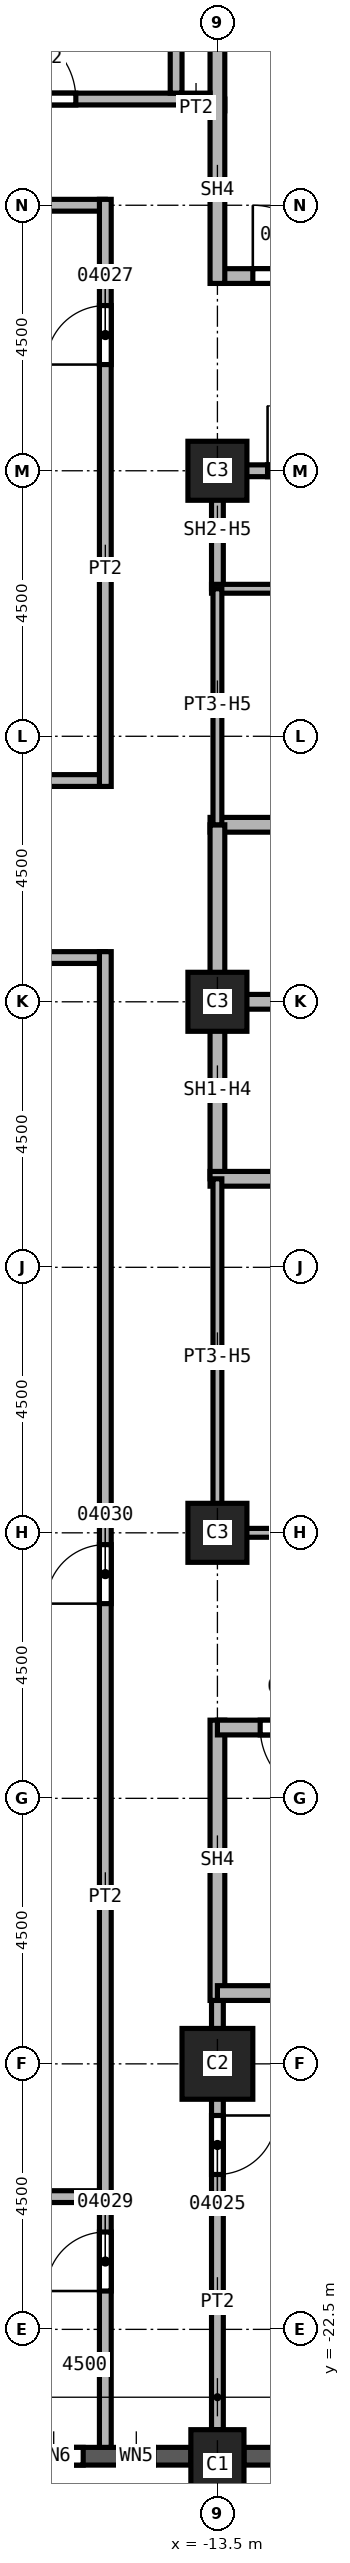
"""IFC4 building model, lengths in metres.
Left out: names, types, materials, properties, quantities, classifications, styles, units other than length and angle.
Written with IfcOpenShell. Run it as: python <this file> out.ifc"""

import sys

from ifc_helpers import new_model, si_unit, direction, frame, frame_2d, origin, origin_2d, place, context, subcontext, project, spatial, rectangle, extrude, element, fill, save


model = new_model("IFC4")
c1 = context("Model", 3, precision=1e-05, world=origin(), true_north=direction((0.0, 1.0)))
c2 = subcontext(c1, "Body", "Model", "MODEL_VIEW")
j1 = project(units=[si_unit("LENGTHUNIT", "METRE"), si_unit("PLANEANGLEUNIT", "RADIAN")], contexts=[c1])
p1 = place(None, origin())
s1 = spatial("IfcSite", under=j1, at=p1, CompositionType="ELEMENT")
p2 = place(p1, origin())
s2 = spatial("IfcBuilding", under=s1, at=p2, CompositionType="ELEMENT")
p3 = place(p2, frame((0.0, 0.0, 104.0)))
s3 = spatial("IfcBuildingStorey", under=s2, at=p3, CompositionType="ELEMENT", Elevation=104.0)
p4 = place(p3, frame((-13.5, -18.0, 0.0), z_axis=(0.0, 0.0, 1.0), x_axis=(1.0, 0.0, 0.0)))
e1 = element("IfcColumn", 1, at=p4, inside=s3, PredefinedType="COLUMN", context=c2, shape_type="SweptSolid", body=[
    extrude(rectangle(XDim=1.2, YDim=1.2, at=origin_2d()), origin(), (0.0, 0.0, 1.0), 3.7),
])
for number, where, z_axis, x_axis in (
    (2, (-13.5, 0.0, 0.0), (0.0, 0.0, 1.0), (1.0, 0.0, 0.0)),
    (3, (-13.5, 9.0, 0.0), (0.0, 0.0, 1.0), (1.0, 0.0, 0.0)),
    (4, (-13.5, -9.0, 0.0), (0.0, 0.0, 1.0), (1.0, 0.0, 0.0)),
):
    element("IfcColumn", number, at=place(p3, frame(where, z_axis=z_axis, x_axis=x_axis)), inside=s3, PredefinedType="COLUMN", context=c2, shape_type="SweptSolid", body=[
        extrude(rectangle(XDim=1.0, YDim=1.0, at=origin_2d()), origin(), (0.0, 0.0, 1.0), 3.7),
    ])
p5 = place(p3, frame((-13.5, -24.8, 0.0), z_axis=(0.0, 0.0, 1.0), x_axis=(1.0, 0.0, 0.0)))
e5 = element("IfcColumn", 5, at=p5, inside=s3, PredefinedType="COLUMN", context=c2, shape_type="SweptSolid", body=[
    extrude(rectangle(XDim=0.9, YDim=1.2, at=origin_2d()), origin(), (0.0, 0.0, 1.0), 3.7),
])
p6 = place(p3, frame((-17.55, -24.65, 0.0), z_axis=(0.0, 0.0, 1.0), x_axis=(1.0, 0.0, 0.0)))
e6 = element("IfcWall", 6, at=p6, inside=s3, PredefinedType="SOLIDWALL", context=c2, shape_type="SweptSolid", body=[
    extrude(rectangle(XDim=3.6, YDim=0.3, at=frame_2d((1.8, 0.0))), origin(), (0.0, 0.0, 1.0), 3.1),
])
p7 = place(p6, frame((0.775, 0.0, 0.8)))
e7 = element("IfcOpeningElement", 7, at=p7, cuts=e6, PredefinedType="OPENING", context=c2, shape_type="SweptSolid", body=[
    extrude(rectangle(XDim=1.0, YDim=1.95, at=frame_2d((0.5, 0.975))), frame((0.0, 0.15, 0.0), z_axis=(0.0, -1.0, 0.0), x_axis=(1.0, 0.0, 0.0)), (0.0, 0.0, 1.0), 0.3),
])
p8 = place(p6, frame((2.375, 0.0, 0.8)))
e8 = element("IfcOpeningElement", 8, at=p8, cuts=e6, PredefinedType="OPENING", context=c2, shape_type="SweptSolid", body=[
    extrude(rectangle(XDim=0.6, YDim=1.95, at=frame_2d((0.3, 0.975))), frame((0.0, 0.15, 0.0), z_axis=(0.0, -1.0, 0.0), x_axis=(1.0, 0.0, 0.0)), (0.0, 0.0, 1.0), 0.3),
])
p9 = place(p3, frame((-13.05, -24.65, 0.0), z_axis=(0.0, 0.0, 1.0), x_axis=(1.0, 0.0, 0.0)))
e9 = element("IfcWall", 9, at=p9, inside=s3, PredefinedType="SOLIDWALL", context=c2, shape_type="SweptSolid", body=[
    extrude(rectangle(XDim=3.6, YDim=0.3, at=frame_2d((1.8, 0.0))), origin(), (0.0, 0.0, 1.0), 3.1),
])
p10 = place(p9, frame((0.6, 0.0, 0.8)))
e10 = element("IfcOpeningElement", 10, at=p10, cuts=e9, PredefinedType="OPENING", context=c2, shape_type="SweptSolid", body=[
    extrude(rectangle(XDim=2.4, YDim=1.95, at=frame_2d((1.2, 0.975))), frame((0.0, 0.15, 0.0), z_axis=(0.0, -1.0, 0.0), x_axis=(1.0, 0.0, 0.0)), (0.0, 0.0, 1.0), 0.3),
])
p11 = place(p3, frame((-33.85, 3.75, 0.0), z_axis=(0.0, 0.0, 1.0), x_axis=(1.0, 0.0, 0.0)))
e11 = element("IfcWall", 11, at=p11, inside=s3, PredefinedType="PARTITIONING", context=c2, shape_type="SweptSolid", body=[
    extrude(rectangle(XDim=18.45, YDim=0.2, at=frame_2d((9.225, 0.0))), origin(), (0.0, 0.0, 1.0), 3.7),
])
p12 = place(p3, frame((-15.4, 0.75, 0.0), z_axis=(0.0, 0.0, 1.0), x_axis=(-1.0, 0.0, 0.0)))
e12 = element("IfcWall", 12, at=p12, inside=s3, PredefinedType="PARTITIONING", context=c2, shape_type="SweptSolid", body=[
    extrude(rectangle(XDim=18.45, YDim=0.2, at=frame_2d((9.225, 0.0))), origin(), (0.0, 0.0, 1.0), 3.7),
])
p13 = place(p12, frame((12.65, 0.0, 0.0)))
e13 = element("IfcOpeningElement", 13, at=p13, cuts=e12, PredefinedType="OPENING", context=c2, shape_type="SweptSolid", body=[
    extrude(rectangle(XDim=1.0, YDim=2.1, at=frame_2d((0.5, 1.05))), frame((0.0, 0.1, 0.0), z_axis=(0.0, -1.0, 0.0), x_axis=(1.0, 0.0, 0.0)), (0.0, 0.0, 1.0), 0.2),
])
p14 = place(p3, frame((-24.3, -20.25, 0.0), z_axis=(0.0, 0.0, 1.0), x_axis=(1.0, 0.0, 0.0)))
e14 = element("IfcWall", 14, at=p14, inside=s3, PredefinedType="PARTITIONING", context=c2, shape_type="SweptSolid", body=[
    extrude(rectangle(XDim=8.9, YDim=0.2, at=frame_2d((4.45, 0.0))), origin(), (0.0, 0.0, 1.0), 3.7),
])
p15 = place(p3, frame((-15.4, 13.5, 0.0), z_axis=(0.0, 0.0, 1.0), x_axis=(-1.0, 0.0, 0.0)))
e15 = element("IfcWall", 15, at=p15, inside=s3, PredefinedType="PARTITIONING", context=c2, shape_type="SweptSolid", body=[
    extrude(rectangle(XDim=6.6, YDim=0.2, at=frame_2d((3.3, 0.0))), origin(), (0.0, 0.0, 1.0), 3.7),
])
p16 = place(p3, frame((-15.4, -24.5, 0.0), z_axis=(0.0, 0.0, 1.0), x_axis=(0.0, 1.0, 0.0)))
e16 = element("IfcWall", 16, at=p16, inside=s3, PredefinedType="PARTITIONING", context=c2, shape_type="SweptSolid", body=[
    extrude(rectangle(XDim=25.35, YDim=0.2, at=frame_2d((12.675, 0.0))), origin(), (0.0, 0.0, 1.0), 3.7),
])
p17 = place(p16, frame((2.65, 0.0, 0.0)))
e17 = element("IfcOpeningElement", 17, at=p17, cuts=e16, PredefinedType="OPENING", context=c2, shape_type="SweptSolid", body=[
    extrude(rectangle(XDim=1.0, YDim=2.1, at=frame_2d((0.5, 1.05))), frame((0.0, 0.1, 0.0), z_axis=(0.0, -1.0, 0.0), x_axis=(1.0, 0.0, 0.0)), (0.0, 0.0, 1.0), 0.2),
])
p18 = place(p16, frame((14.3, 0.0, 0.0)))
e18 = element("IfcOpeningElement", 18, at=p18, cuts=e16, PredefinedType="OPENING", context=c2, shape_type="SweptSolid", body=[
    extrude(rectangle(XDim=1.0, YDim=2.1, at=frame_2d((0.5, 1.05))), frame((0.0, 0.1, 0.0), z_axis=(0.0, -1.0, 0.0), x_axis=(1.0, 0.0, 0.0)), (0.0, 0.0, 1.0), 0.2),
])
p19 = place(p3, frame((-15.4, 3.65, 0.0), z_axis=(0.0, 0.0, 1.0), x_axis=(0.0, 1.0, 0.0)))
e19 = element("IfcWall", 19, at=p19, inside=s3, PredefinedType="PARTITIONING", context=c2, shape_type="SweptSolid", body=[
    extrude(rectangle(XDim=9.95, YDim=0.2, at=frame_2d((4.975, 0.0))), origin(), (0.0, 0.0, 1.0), 3.7),
])
p20 = place(p19, frame((7.15, 0.0, 0.0)))
e20 = element("IfcOpeningElement", 20, at=p20, cuts=e19, PredefinedType="OPENING", context=c2, shape_type="SweptSolid", body=[
    extrude(rectangle(XDim=1.0, YDim=2.1, at=frame_2d((0.5, 1.05))), frame((0.0, 0.1, 0.0), z_axis=(0.0, -1.0, 0.0), x_axis=(1.0, 0.0, 0.0)), (0.0, 0.0, 1.0), 0.2),
])
p21 = place(p3, frame((-14.1, 15.2, 0.0), z_axis=(0.0, 0.0, 1.0), x_axis=(1.0, 0.0, 0.0)))
e21 = element("IfcWall", 21, at=p21, inside=s3, PredefinedType="PARTITIONING", context=c2, shape_type="SweptSolid", body=[
    extrude(rectangle(XDim=0.725, YDim=0.2, at=frame_2d((0.363, 0.0))), origin(), (0.0, 0.0, 1.0), 3.7),
])
p22 = place(p3, frame((-13.5, -16.675, 0.0), z_axis=(0.0, 0.0, 1.0), x_axis=(0.0, -1.0, 0.0)))
e22 = element("IfcWall", 22, at=p22, inside=s3, PredefinedType="PARTITIONING", context=c2, shape_type="SweptSolid", body=[
    extrude(rectangle(XDim=7.525, YDim=0.2, at=frame_2d((3.762, 0.0))), origin(), (0.0, 0.0, 1.0), 3.7),
])
p23 = place(p22, frame((2.2, 0.0, 0.0)))
e23 = element("IfcOpeningElement", 23, at=p23, cuts=e22, PredefinedType="OPENING", context=c2, shape_type="SweptSolid", body=[
    extrude(rectangle(XDim=1.0, YDim=2.1, at=frame_2d((0.5, 1.05))), frame((0.0, 0.1, 0.0), z_axis=(0.0, -1.0, 0.0), x_axis=(1.0, 0.0, 0.0)), (0.0, 0.0, 1.0), 0.2),
])
p24 = place(p3, frame((-13.5, 7.0, 0.0), z_axis=(0.0, 0.0, 1.0), x_axis=(0.0, 1.0, 0.0)))
e24 = element("IfcWall", 24, at=p24, inside=s3, PredefinedType="SOLIDWALL", context=c2, shape_type="SweptSolid", body=[
    extrude(rectangle(XDim=2.1, YDim=0.2, at=frame_2d((1.05, 0.0))), origin(), (0.0, 0.0, 1.0), 2.938),
])
p25 = place(p3, frame((-13.5, 9.0, 0.0), z_axis=(0.0, 0.0, 1.0), x_axis=(1.0, 0.0, 0.0)))
e25 = element("IfcWall", 25, at=p25, inside=s3, PredefinedType="SOLIDWALL", context=c2, shape_type="SweptSolid", body=[
    extrude(rectangle(XDim=3.0, YDim=0.2, at=frame_2d((1.5, 0.0))), origin(), (0.0, 0.0, 1.0), 2.938),
])
p26 = place(p25, frame((0.85, 0.0, 0.0)))
e26 = element("IfcOpeningElement", 26, at=p26, cuts=e25, PredefinedType="OPENING", context=c2, shape_type="SweptSolid", body=[
    extrude(rectangle(XDim=1.1, YDim=2.1, at=frame_2d((0.55, 1.05))), frame((0.0, 0.1, 0.0), z_axis=(0.0, -1.0, 0.0), x_axis=(1.0, 0.0, 0.0)), (0.0, 0.0, 1.0), 0.2),
])
p27 = place(p3, frame((-13.625, 0.0, 0.0), z_axis=(0.0, 0.0, 1.0), x_axis=(1.0, 0.0, 0.0)))
e27 = element("IfcWall", 27, at=p27, inside=s3, PredefinedType="SOLIDWALL", context=c2, shape_type="SweptSolid", body=[
    extrude(rectangle(XDim=3.125, YDim=0.25, at=frame_2d((1.562, 0.0))), origin(), (0.0, 0.0, 1.0), 3.7),
])
p28 = place(p3, frame((-13.625, 3.0, 0.0), z_axis=(0.0, 0.0, 1.0), x_axis=(1.0, 0.0, 0.0)))
e28 = element("IfcWall", 28, at=p28, inside=s3, PredefinedType="SOLIDWALL", context=c2, shape_type="SweptSolid", body=[
    extrude(rectangle(XDim=6.125, YDim=0.25, at=frame_2d((3.062, 0.0))), origin(), (0.0, 0.0, 1.0), 3.7),
])
p29 = place(p28, frame((3.25, 0.0, 0.0)))
e29 = element("IfcOpeningElement", 29, at=p29, cuts=e28, PredefinedType="OPENING", context=c2, shape_type="SweptSolid", body=[
    extrude(rectangle(XDim=1.1, YDim=2.1, at=frame_2d((0.55, 1.05))), frame((0.0, 0.125, 0.0), z_axis=(0.0, -1.0, 0.0), x_axis=(1.0, 0.0, 0.0)), (0.0, 0.0, 1.0), 0.25),
])
p30 = place(p3, frame((-13.5, -3.0, 0.0), z_axis=(0.0, 0.0, 1.0), x_axis=(0.0, 1.0, 0.0)))
e30 = element("IfcWall", 30, at=p30, inside=s3, PredefinedType="SOLIDWALL", context=c2, shape_type="SweptSolid", body=[
    extrude(rectangle(XDim=6.0, YDim=0.25, at=frame_2d((3.0, 0.0))), origin(), (0.0, 0.0, 1.0), 2.938),
])
p31 = place(p3, frame((-13.625, -3.0, 0.0), z_axis=(0.0, 0.0, 1.0), x_axis=(1.0, 0.0, 0.0)))
e31 = element("IfcWall", 31, at=p31, inside=s3, PredefinedType="SOLIDWALL", context=c2, shape_type="SweptSolid", body=[
    extrude(rectangle(XDim=9.25, YDim=0.25, at=frame_2d((4.625, 0.0))), origin(), (0.0, 0.0, 1.0), 3.7),
])
p32 = place(p31, frame((3.25, 0.0, 0.0)))
e32 = element("IfcOpeningElement", 32, at=p32, cuts=e31, PredefinedType="OPENING", context=c2, shape_type="SweptSolid", body=[
    extrude(rectangle(XDim=1.1, YDim=2.1, at=frame_2d((0.55, 1.05))), frame((0.0, 0.125, 0.0), z_axis=(0.0, -1.0, 0.0), x_axis=(1.0, 0.0, 0.0)), (0.0, 0.0, 1.0), 0.25),
])
p33 = place(p3, frame((-13.5, -12.175, 0.0), z_axis=(0.0, 0.0, 1.0), x_axis=(0.0, -1.0, 0.0)))
e33 = element("IfcWall", 33, at=p33, inside=s3, PredefinedType="SOLIDWALL", context=c2, shape_type="SweptSolid", body=[
    extrude(rectangle(XDim=4.75, YDim=0.25, at=frame_2d((2.375, 0.0))), origin(), (0.0, 0.0, 1.0), 3.7),
])
p34 = place(p3, frame((-13.5, 12.3, 0.0), z_axis=(0.0, 0.0, 1.0), x_axis=(1.0, 0.0, 0.0)))
e34 = element("IfcWall", 34, at=p34, inside=s3, PredefinedType="SOLIDWALL", context=c2, shape_type="SweptSolid", body=[
    extrude(rectangle(XDim=9.125, YDim=0.25, at=frame_2d((4.562, 0.0))), origin(), (0.0, 0.0, 1.0), 3.7),
])
p35 = place(p34, frame((0.6, 0.0, 0.0)))
e35 = element("IfcOpeningElement", 35, at=p35, cuts=e34, PredefinedType="OPENING", context=c2, shape_type="SweptSolid", body=[
    extrude(rectangle(XDim=1.2, YDim=2.1, at=frame_2d((0.6, 1.05))), frame((0.0, 0.125, 0.0), z_axis=(0.0, -1.0, 0.0), x_axis=(1.0, 0.0, 0.0)), (0.0, 0.0, 1.0), 0.25),
])
p36 = place(p3, frame((-13.5, 12.175, 0.0), z_axis=(0.0, 0.0, 1.0), x_axis=(0.0, 1.0, 0.0)))
e36 = element("IfcWall", 36, at=p36, inside=s3, PredefinedType="SOLIDWALL", context=c2, shape_type="SweptSolid", body=[
    extrude(rectangle(XDim=4.75, YDim=0.25, at=frame_2d((2.375, 0.0))), origin(), (0.0, 0.0, 1.0), 3.7),
])
p37 = place(p3, frame((-4.5, -16.8, 0.0), z_axis=(0.0, 0.0, 1.0), x_axis=(-1.0, 0.0, 0.0)))
e37 = element("IfcWall", 37, at=p37, inside=s3, PredefinedType="SOLIDWALL", context=c2, shape_type="SweptSolid", body=[
    extrude(rectangle(XDim=9.0, YDim=0.25, at=frame_2d((4.5, 0.0))), origin(), (0.0, 0.0, 1.0), 3.7),
])
p38 = place(p3, frame((-4.375, -12.3, 0.0), z_axis=(0.0, 0.0, 1.0), x_axis=(-1.0, 0.0, 0.0)))
e38 = element("IfcWall", 38, at=p38, inside=s3, PredefinedType="SOLIDWALL", context=c2, shape_type="SweptSolid", body=[
    extrude(rectangle(XDim=9.125, YDim=0.25, at=frame_2d((4.562, 0.0))), origin(), (0.0, 0.0, 1.0), 3.7),
])
p39 = place(p38, frame((7.2, 0.0, 0.0)))
e39 = element("IfcOpeningElement", 39, at=p39, cuts=e38, PredefinedType="OPENING", context=c2, shape_type="SweptSolid", body=[
    extrude(rectangle(XDim=1.2, YDim=2.1, at=frame_2d((0.6, 1.05))), frame((0.0, 0.125, 0.0), z_axis=(0.0, -1.0, 0.0), x_axis=(1.0, 0.0, 0.0)), (0.0, 0.0, 1.0), 0.25),
])
p40 = place(p3, frame((-13.6, 7.0, 0.0), z_axis=(0.0, 0.0, 1.0), x_axis=(1.0, 0.0, 0.0)))
e40 = element("IfcWall", 40, at=p40, inside=s3, PredefinedType="PARTITIONING", context=c2, shape_type="SweptSolid", body=[
    extrude(rectangle(XDim=3.1, YDim=0.15, at=frame_2d((1.55, 0.0))), origin(), (0.0, 0.0, 1.0), 3.7),
])
p41 = place(p3, frame((-13.5, -9.075, 0.0), z_axis=(0.0, 0.0, 1.0), x_axis=(0.0, 1.0, 0.0)))
e41 = element("IfcWall", 41, at=p41, inside=s3, PredefinedType="PARTITIONING", context=c2, shape_type="SweptSolid", body=[
    extrude(rectangle(XDim=6.075, YDim=0.15, at=frame_2d((3.038, 0.0))), origin(), (0.0, 0.0, 1.0), 2.938),
])
p42 = place(p3, frame((-13.5, 3.0, 0.0), z_axis=(0.0, 0.0, 1.0), x_axis=(0.0, 1.0, 0.0)))
e42 = element("IfcWall", 42, at=p42, inside=s3, PredefinedType="PARTITIONING", context=c2, shape_type="SweptSolid", body=[
    extrude(rectangle(XDim=4.0, YDim=0.15, at=frame_2d((2.0, 0.0))), origin(), (0.0, 0.0, 1.0), 2.938),
])
p43 = place(p3, frame((-10.5, -9.0, 0.0), z_axis=(0.0, 0.0, 1.0), x_axis=(-1.0, 0.0, 0.0)))
e43 = element("IfcWall", 43, at=p43, inside=s3, PredefinedType="PARTITIONING", context=c2, shape_type="SweptSolid", body=[
    extrude(rectangle(XDim=3.0, YDim=0.15, at=frame_2d((1.5, 0.0))), origin(), (0.0, 0.0, 1.0), 2.938),
])
p44 = place(p3, frame((-21.9, 15.3, 0.0), z_axis=(0.0, 0.0, 1.0), x_axis=(1.0, 0.0, 0.0)))
e44 = element("IfcWall", 44, at=p44, inside=s3, PredefinedType="SOLIDWALL", context=c2, shape_type="SweptSolid", body=[
    extrude(rectangle(XDim=8.275, YDim=0.2, at=frame_2d((4.137, 0.0))), origin(), (0.0, 0.0, 1.0), 3.7),
])
p45 = place(p44, frame((4.8, 0.0, 0.0)))
e45 = element("IfcOpeningElement", 45, at=p45, cuts=e44, PredefinedType="OPENING", context=c2, shape_type="SweptSolid", body=[
    extrude(rectangle(XDim=1.2, YDim=2.1, at=frame_2d((0.6, 1.05))), frame((0.0, 0.1, 0.0), z_axis=(0.0, -1.0, 0.0), x_axis=(1.0, 0.0, 0.0)), (0.0, 0.0, 1.0), 0.2),
])
p46 = place(p3, frame((-14.2, 15.4, 0.0), z_axis=(0.0, 0.0, 1.0), x_axis=(0.0, 1.0, 0.0)))
e46 = element("IfcWall", 46, at=p46, inside=s3, PredefinedType="SOLIDWALL", context=c2, shape_type="SweptSolid", body=[
    extrude(rectangle(XDim=5.9, YDim=0.2, at=frame_2d((2.95, 0.0))), origin(), (0.0, 0.0, 1.0), 3.7),
])
p47 = place(p26, origin())
e47 = element("IfcDoor", 47, at=p47, inside=s3, OperationType="SINGLE_SWING_RIGHT", PredefinedType="DOOR", context=c2, shape_type="SweptSolid", body=[
    extrude(rectangle(XDim=1.1, YDim=2.1, at=frame_2d((0.55, 1.05))), frame((0.0, 0.025, 0.0), z_axis=(0.0, -1.0, 0.0), x_axis=(1.0, 0.0, 0.0)), (0.0, 0.0, 1.0), 0.05),
])
fill(e26, e47)
p48 = place(p35, origin())
e48 = element("IfcDoor", 48, at=p48, inside=s3, OperationType="SINGLE_SWING_RIGHT", PredefinedType="DOOR", context=c2, shape_type="SweptSolid", body=[
    extrude(rectangle(XDim=1.2, YDim=2.1, at=frame_2d((0.6, 1.05))), frame((0.0, 0.025, 0.0), z_axis=(0.0, -1.0, 0.0), x_axis=(1.0, 0.0, 0.0)), (0.0, 0.0, 1.0), 0.05),
])
fill(e35, e48)
p49 = place(p39, origin())
e49 = element("IfcDoor", 49, at=p49, inside=s3, OperationType="SINGLE_SWING_LEFT", PredefinedType="DOOR", context=c2, shape_type="SweptSolid", body=[
    extrude(rectangle(XDim=1.2, YDim=2.1, at=frame_2d((0.6, 1.05))), frame((0.0, 0.025, 0.0), z_axis=(0.0, -1.0, 0.0), x_axis=(1.0, 0.0, 0.0)), (0.0, 0.0, 1.0), 0.05),
])
fill(e39, e49)
p50 = place(p23, origin())
e50 = element("IfcDoor", 50, at=p50, inside=s3, OperationType="SINGLE_SWING_RIGHT", PredefinedType="DOOR", context=c2, shape_type="SweptSolid", body=[
    extrude(rectangle(XDim=1.0, YDim=2.1, at=frame_2d((0.5, 1.05))), frame((0.0, 0.025, 0.0), z_axis=(0.0, -1.0, 0.0), x_axis=(1.0, 0.0, 0.0)), (0.0, 0.0, 1.0), 0.05),
])
fill(e23, e50)
p51 = place(p20, origin())
e51 = element("IfcDoor", 51, at=p51, inside=s3, OperationType="SINGLE_SWING_RIGHT", PredefinedType="DOOR", context=c2, shape_type="SweptSolid", body=[
    extrude(rectangle(XDim=1.0, YDim=2.1, at=frame_2d((0.5, 1.05))), frame((0.0, 0.025, 0.0), z_axis=(0.0, -1.0, 0.0), x_axis=(1.0, 0.0, 0.0)), (0.0, 0.0, 1.0), 0.05),
])
fill(e20, e51)
p52 = place(p17, origin())
e52 = element("IfcDoor", 52, at=p52, inside=s3, OperationType="SINGLE_SWING_RIGHT", PredefinedType="DOOR", context=c2, shape_type="SweptSolid", body=[
    extrude(rectangle(XDim=1.0, YDim=2.1, at=frame_2d((0.5, 1.05))), frame((0.0, 0.025, 0.0), z_axis=(0.0, -1.0, 0.0), x_axis=(1.0, 0.0, 0.0)), (0.0, 0.0, 1.0), 0.05),
])
fill(e17, e52)
p53 = place(p18, origin())
e53 = element("IfcDoor", 53, at=p53, inside=s3, OperationType="SINGLE_SWING_LEFT", PredefinedType="DOOR", context=c2, shape_type="SweptSolid", body=[
    extrude(rectangle(XDim=1.0, YDim=2.1, at=frame_2d((0.5, 1.05))), frame((0.0, 0.025, 0.0), z_axis=(0.0, -1.0, 0.0), x_axis=(1.0, 0.0, 0.0)), (0.0, 0.0, 1.0), 0.05),
])
fill(e18, e53)
p54 = place(p45, origin())
e54 = element("IfcDoor", 54, at=p54, inside=s3, OperationType="SINGLE_SWING_RIGHT", PredefinedType="DOOR", context=c2, shape_type="SweptSolid", body=[
    extrude(rectangle(XDim=1.2, YDim=2.1, at=frame_2d((0.6, 1.05))), frame((0.0, 0.025, 0.0), z_axis=(0.0, -1.0, 0.0), x_axis=(1.0, 0.0, 0.0)), (0.0, 0.0, 1.0), 0.05),
])
fill(e45, e54)
p55 = place(p7, origin())
e55 = element("IfcWindow", 55, at=p55, inside=s3, PartitioningType="SINGLE_PANEL", PredefinedType="WINDOW", context=c2, shape_type="SweptSolid", body=[
    extrude(rectangle(XDim=1.0, YDim=1.95, at=frame_2d((0.5, 0.975))), frame((0.0, 0.03, 0.0), z_axis=(0.0, -1.0, 0.0), x_axis=(1.0, 0.0, 0.0)), (0.0, 0.0, 1.0), 0.06),
])
fill(e7, e55)
p56 = place(p8, origin())
e56 = element("IfcWindow", 56, at=p56, inside=s3, PartitioningType="SINGLE_PANEL", PredefinedType="WINDOW", context=c2, shape_type="SweptSolid", body=[
    extrude(rectangle(XDim=0.6, YDim=1.95, at=frame_2d((0.3, 0.975))), frame((0.0, 0.03, 0.0), z_axis=(0.0, -1.0, 0.0), x_axis=(1.0, 0.0, 0.0)), (0.0, 0.0, 1.0), 0.06),
])
fill(e8, e56)
save(model, sys.argv[1])
